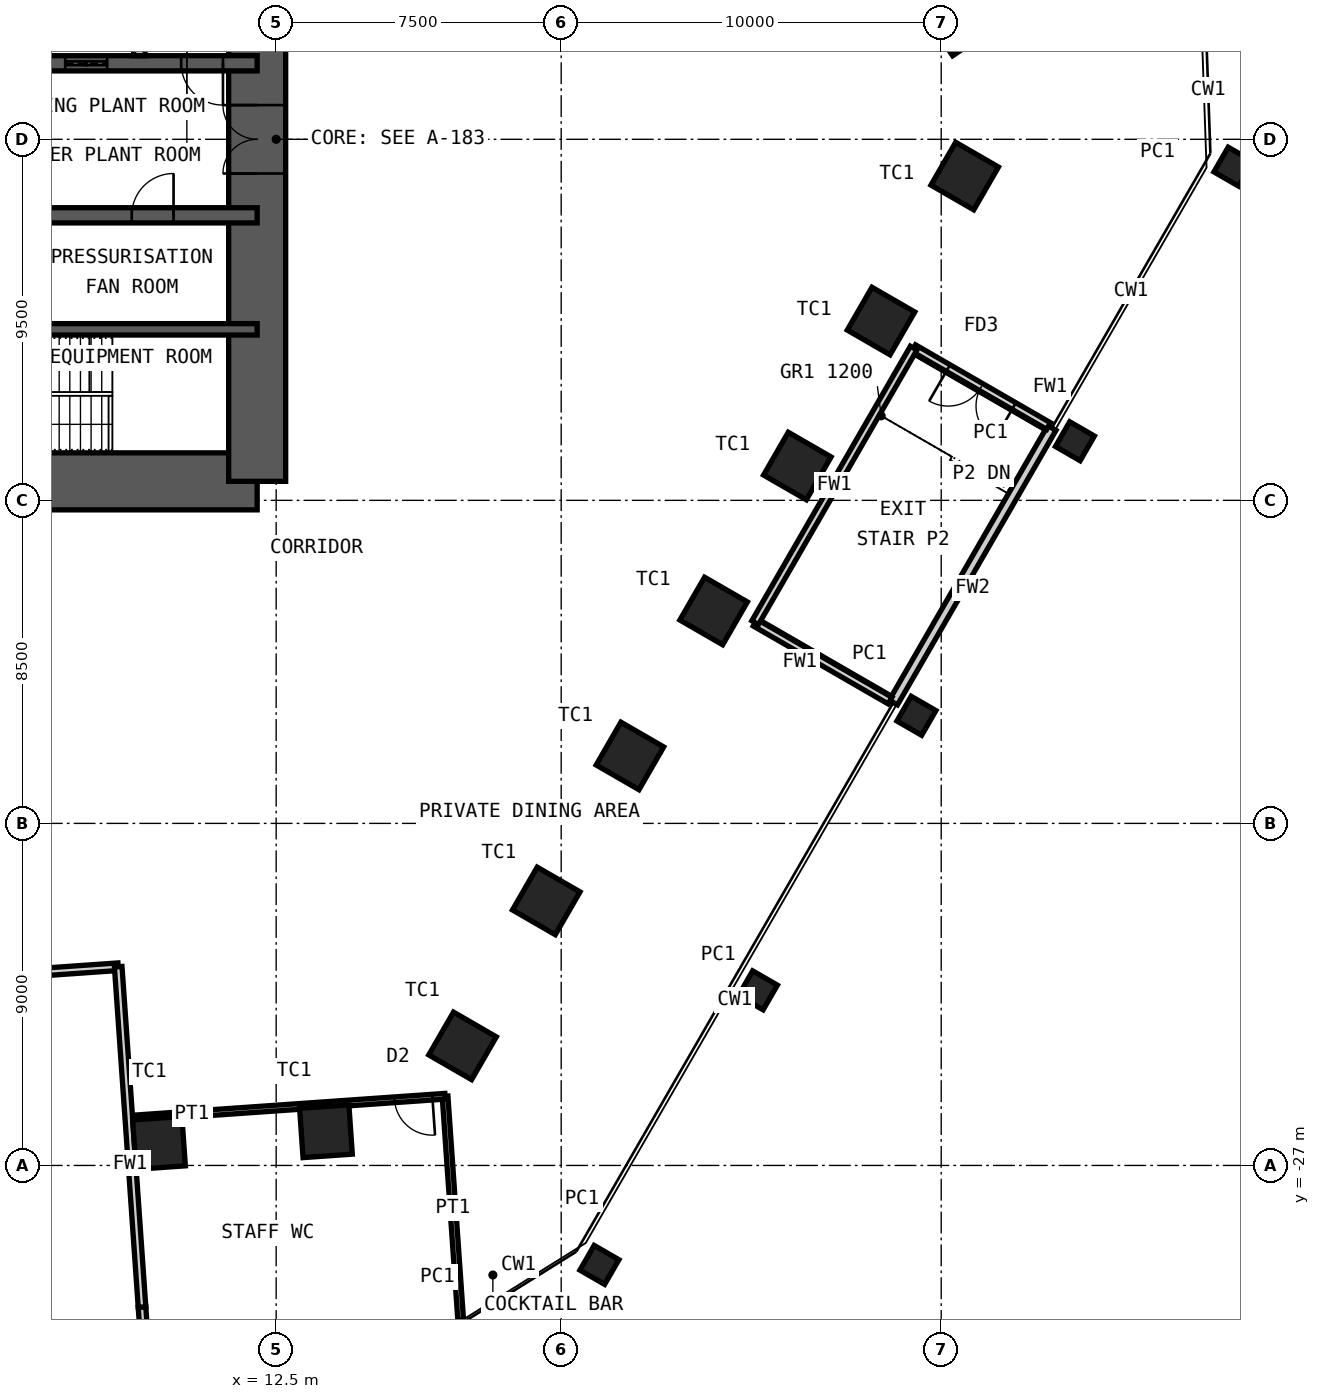
"""IFC4 building model, lengths in metres.
Left out: names, types, materials, properties, quantities, classifications, styles, units other than length and angle.
Written with IfcOpenShell. Run it as: python <this file> out.ifc"""

import sys

from ifc_helpers import new_model, si_unit, direction, frame, frame_2d, origin, origin_2d, place, context, subcontext, project, spatial, rectangle, hollow_rectangle, extrude, element, fill, save


model = new_model("IFC4")
c1 = context("Model", 3, precision=1e-05, world=origin(), true_north=direction((0.0, 1.0)))
c2 = subcontext(c1, "Body", "Model", "MODEL_VIEW")
j1 = project(units=[si_unit("LENGTHUNIT", "METRE"), si_unit("PLANEANGLEUNIT", "RADIAN")], contexts=[c1])
p1 = place(None, origin())
s1 = spatial("IfcSite", under=j1, at=p1, CompositionType="ELEMENT")
p2 = place(p1, origin())
s2 = spatial("IfcBuilding", under=s1, at=p2, CompositionType="ELEMENT")
p3 = place(p2, frame((0.0, 0.0, 12.0)))
s3 = spatial("IfcBuildingStorey", under=s2, at=p3, CompositionType="ELEMENT", Elevation=12.0)
for number, where, z_axis, x_axis in (
    (1, (30.476, 3.101, 0.0), (0.0, 0.0, 1.0), (-0.559, 0.829, 0.0)),
    (2, (30.618, -0.967, 0.0), (0.0, 0.0, 1.0), (0.5, 0.866, 0.0)),
    (3, (28.416, -4.782, 0.0), (0.0, 0.0, 1.0), (0.5, 0.866, 0.0)),
    (4, (26.214, -8.596, 0.0), (0.0, 0.0, 1.0), (0.5, 0.866, 0.0)),
    (5, (24.011, -12.411, 0.0), (0.0, 0.0, 1.0), (0.5, 0.866, 0.0)),
    (6, (21.809, -16.225, 0.0), (0.0, 0.0, 1.0), (0.5, 0.866, 0.0)),
    (7, (19.607, -20.04, 0.0), (0.0, 0.0, 1.0), (0.5, 0.866, 0.0)),
    (8, (17.405, -23.854, 0.0), (0.0, 0.0, 1.0), (0.5, 0.866, 0.0)),
    (9, (13.811, -26.1, 0.0), (0.0, 0.0, 1.0), (0.998, 0.07, 0.0)),
    (10, (9.417, -26.407, 0.0), (0.0, 0.0, 1.0), (0.998, 0.07, 0.0)),
):
    element("IfcColumn", number, at=place(p3, frame(where, z_axis=z_axis, x_axis=x_axis)), inside=s3, PredefinedType="COLUMN", context=c2, shape_type="SweptSolid", body=[
        extrude(hollow_rectangle(XDim=1.3, YDim=1.3, WallThickness=0.1, at=origin_2d()), origin(), (0.0, 0.0, 1.0), 5.0),
    ])
for number, where, z_axis, x_axis in (
    (11, (37.689, -0.72, 0.0), (0.0, 0.0, 1.0), (0.5, 0.866, 0.0)),
    (12, (33.518, -7.945, 0.0), (0.0, 0.0, 1.0), (0.5, 0.866, 0.0)),
    (13, (29.347, -15.169, 0.0), (0.0, 0.0, 1.0), (0.5, 0.866, 0.0)),
    (14, (25.177, -22.393, 0.0), (0.0, 0.0, 1.0), (0.5, 0.866, 0.0)),
    (15, (21.006, -29.617, 0.0), (0.0, 0.0, 1.0), (0.5, 0.866, 0.0)),
):
    element("IfcColumn", number, at=place(p3, frame(where, z_axis=z_axis, x_axis=x_axis)), inside=s3, PredefinedType="COLUMN", context=c2, shape_type="SweptSolid", body=[
        extrude(hollow_rectangle(XDim=0.75, YDim=0.75, WallThickness=0.036, at=origin_2d()), origin(), (0.0, 0.0, 1.0), 5.0),
    ])
p4 = place(p3, frame((-12.0, -9.0, 0.0), z_axis=(0.0, 0.0, 1.0), x_axis=(1.0, 0.0, 0.0)))
e16 = element("IfcWall", 16, at=p4, inside=s3, PredefinedType="SHEAR", context=c2, shape_type="SweptSolid", body=[
    extrude(rectangle(XDim=24.0, YDim=1.5, at=frame_2d((12.0, 0.0))), origin(), (0.0, 0.0, 1.0), 5.0),
])
p5 = place(p4, frame((1.35, 0.0, 0.0)))
e17 = element("IfcOpeningElement", 17, at=p5, cuts=e16, PredefinedType="OPENING", context=c2, shape_type="SweptSolid", body=[
    extrude(rectangle(XDim=1.0, YDim=2.1, at=frame_2d((0.5, 1.05))), frame((0.0, 0.76, 0.0), z_axis=(0.0, -1.0, 0.0), x_axis=(1.0, 0.0, 0.0)), (0.0, 0.0, 1.0), 1.52),
])
p6 = place(p4, frame((5.325, 0.0, 0.0)))
e18 = element("IfcOpeningElement", 18, at=p6, cuts=e16, PredefinedType="OPENING", context=c2, shape_type="SweptSolid", body=[
    extrude(rectangle(XDim=1.15, YDim=2.1, at=frame_2d((0.575, 1.05))), frame((0.0, 0.76, 0.0), z_axis=(0.0, -1.0, 0.0), x_axis=(1.0, 0.0, 0.0)), (0.0, 0.0, 1.0), 1.52),
])
p7 = place(p4, frame((12.6, 0.0, 0.0)))
e19 = element("IfcOpeningElement", 19, at=p7, cuts=e16, PredefinedType="OPENING", context=c2, shape_type="SweptSolid", body=[
    extrude(rectangle(XDim=1.0, YDim=2.1, at=frame_2d((0.5, 1.05))), frame((0.0, 0.76, 0.0), z_axis=(0.0, -1.0, 0.0), x_axis=(1.0, 0.0, 0.0)), (0.0, 0.0, 1.0), 1.52),
])
p8 = place(p3, frame((12.0, -9.0, 0.0), z_axis=(0.0, 0.0, 1.0), x_axis=(0.0, 1.0, 0.0)))
e20 = element("IfcWall", 20, at=p8, inside=s3, PredefinedType="SHEAR", context=c2, shape_type="SweptSolid", body=[
    extrude(rectangle(XDim=18.0, YDim=1.5, at=frame_2d((9.0, 0.0))), origin(), (0.0, 0.0, 1.0), 5.0),
])
p9 = place(p8, frame((8.1, 0.0, 0.0)))
e21 = element("IfcOpeningElement", 21, at=p9, cuts=e20, PredefinedType="OPENING", context=c2, shape_type="SweptSolid", body=[
    extrude(rectangle(XDim=1.8, YDim=2.1, at=frame_2d((0.9, 1.05))), frame((0.0, 0.76, 0.0), z_axis=(0.0, -1.0, 0.0), x_axis=(1.0, 0.0, 0.0)), (0.0, 0.0, 1.0), 1.52),
])
p10 = place(p3, frame((-12.0, 2.0, 0.0), z_axis=(0.0, 0.0, 1.0), x_axis=(1.0, 0.0, 0.0)))
e22 = element("IfcWall", 22, at=p10, inside=s3, PredefinedType="SHEAR", context=c2, shape_type="SweptSolid", body=[
    extrude(rectangle(XDim=24.0, YDim=0.4, at=frame_2d((12.0, 0.0))), origin(), (0.0, 0.0, 1.0), 5.0),
])
p11 = place(p10, frame((2.4, 0.0, 0.0)))
e23 = element("IfcOpeningElement", 23, at=p11, cuts=e22, PredefinedType="OPENING", context=c2, shape_type="SweptSolid", body=[
    extrude(rectangle(XDim=1.1, YDim=2.1, at=frame_2d((0.55, 1.05))), frame((0.0, 0.21, 0.0), z_axis=(0.0, -1.0, 0.0), x_axis=(1.0, 0.0, 0.0)), (0.0, 0.0, 1.0), 0.42),
])
p12 = place(p10, frame((22.0, 0.0, 0.0)))
e24 = element("IfcOpeningElement", 24, at=p12, cuts=e22, PredefinedType="OPENING", context=c2, shape_type="SweptSolid", body=[
    extrude(rectangle(XDim=1.1, YDim=2.1, at=frame_2d((0.55, 1.05))), frame((0.0, 0.21, 0.0), z_axis=(0.0, -1.0, 0.0), x_axis=(1.0, 0.0, 0.0)), (0.0, 0.0, 1.0), 0.42),
])
p13 = place(p10, frame((10.15, 0.0, 0.0)))
e25 = element("IfcOpeningElement", 25, at=p13, cuts=e22, PredefinedType="OPENING", context=c2, shape_type="SweptSolid", body=[
    extrude(rectangle(XDim=1.0, YDim=2.1, at=frame_2d((0.5, 1.05))), frame((0.0, 0.21, 0.0), z_axis=(0.0, -1.0, 0.0), x_axis=(1.0, 0.0, 0.0)), (0.0, 0.0, 1.0), 0.42),
])
p14 = place(p10, frame((6.7, 0.0, 0.0)))
e26 = element("IfcOpeningElement", 26, at=p14, cuts=e22, PredefinedType="OPENING", context=c2, shape_type="SweptSolid", body=[
    extrude(rectangle(XDim=1.4, YDim=2.4, at=frame_2d((0.7, 1.2))), frame((0.0, 0.21, 0.0), z_axis=(0.0, -1.0, 0.0), x_axis=(1.0, 0.0, 0.0)), (0.0, 0.0, 1.0), 0.42),
])
p15 = place(p10, frame((13.35, 0.0, 0.0)))
e27 = element("IfcOpeningElement", 27, at=p15, cuts=e22, PredefinedType="OPENING", context=c2, shape_type="SweptSolid", body=[
    extrude(rectangle(XDim=1.1, YDim=2.4, at=frame_2d((0.55, 1.2))), frame((0.0, 0.21, 0.0), z_axis=(0.0, -1.0, 0.0), x_axis=(1.0, 0.0, 0.0)), (0.0, 0.0, 1.0), 0.42),
])
p16 = place(p10, frame((16.15, 0.0, 0.0)))
e28 = element("IfcOpeningElement", 28, at=p16, cuts=e22, PredefinedType="OPENING", context=c2, shape_type="SweptSolid", body=[
    extrude(rectangle(XDim=1.1, YDim=2.4, at=frame_2d((0.55, 1.2))), frame((0.0, 0.21, 0.0), z_axis=(0.0, -1.0, 0.0), x_axis=(1.0, 0.0, 0.0)), (0.0, 0.0, 1.0), 0.42),
])
p17 = place(p10, frame((18.95, 0.0, 0.0)))
e29 = element("IfcOpeningElement", 29, at=p17, cuts=e22, PredefinedType="OPENING", context=c2, shape_type="SweptSolid", body=[
    extrude(rectangle(XDim=1.1, YDim=2.4, at=frame_2d((0.55, 1.2))), frame((0.0, 0.21, 0.0), z_axis=(0.0, -1.0, 0.0), x_axis=(1.0, 0.0, 0.0)), (0.0, 0.0, 1.0), 0.42),
])
p18 = place(p3, frame((-12.0, -2.0, 0.0), z_axis=(0.0, 0.0, 1.0), x_axis=(1.0, 0.0, 0.0)))
e30 = element("IfcWall", 30, at=p18, inside=s3, PredefinedType="SHEAR", context=c2, shape_type="SweptSolid", body=[
    extrude(rectangle(XDim=24.0, YDim=0.4, at=frame_2d((12.0, 0.0))), origin(), (0.0, 0.0, 1.0), 5.0),
])
p19 = place(p18, frame((1.1, 0.0, 0.0)))
e31 = element("IfcOpeningElement", 31, at=p19, cuts=e30, PredefinedType="OPENING", context=c2, shape_type="SweptSolid", body=[
    extrude(rectangle(XDim=1.1, YDim=2.1, at=frame_2d((0.55, 1.05))), frame((0.0, 0.21, 0.0), z_axis=(0.0, -1.0, 0.0), x_axis=(1.0, 0.0, 0.0)), (0.0, 0.0, 1.0), 0.42),
])
p20 = place(p18, frame((13.55, 0.0, 0.0)))
e32 = element("IfcOpeningElement", 32, at=p20, cuts=e30, PredefinedType="OPENING", context=c2, shape_type="SweptSolid", body=[
    extrude(rectangle(XDim=1.1, YDim=2.1, at=frame_2d((0.55, 1.05))), frame((0.0, 0.21, 0.0), z_axis=(0.0, -1.0, 0.0), x_axis=(1.0, 0.0, 0.0)), (0.0, 0.0, 1.0), 0.42),
])
p21 = place(p18, frame((20.7, 0.0, 0.0)))
e33 = element("IfcOpeningElement", 33, at=p21, cuts=e30, PredefinedType="OPENING", context=c2, shape_type="SweptSolid", body=[
    extrude(rectangle(XDim=1.1, YDim=2.1, at=frame_2d((0.55, 1.05))), frame((0.0, 0.21, 0.0), z_axis=(0.0, -1.0, 0.0), x_axis=(1.0, 0.0, 0.0)), (0.0, 0.0, 1.0), 0.42),
])
p22 = place(p3, frame((-12.0, -5.0, 0.0), z_axis=(0.0, 0.0, 1.0), x_axis=(1.0, 0.0, 0.0)))
e34 = element("IfcWall", 34, at=p22, inside=s3, PredefinedType="SHEAR", context=c2, shape_type="SweptSolid", body=[
    extrude(rectangle(XDim=24.0, YDim=0.3, at=frame_2d((12.0, 0.0))), origin(), (0.0, 0.0, 1.0), 5.0),
])
p23 = place(p3, frame((8.9, 2.2, 0.0), z_axis=(0.0, 0.0, 1.0), x_axis=(0.0, 1.0, 0.0)))
e35 = element("IfcWall", 35, at=p23, inside=s3, PredefinedType="PARTITIONING", context=c2, shape_type="SweptSolid", body=[
    extrude(rectangle(XDim=2.65, YDim=0.3, at=frame_2d((1.325, 0.0))), origin(), (0.0, 0.0, 1.0), 4.78),
])
p24 = place(p3, frame((32.912, -7.595, 0.0), z_axis=(0.0, 0.0, 1.0), x_axis=(-0.500004511595, -0.866022798998, 0.0)))
e36 = element("IfcWall", 36, at=p24, inside=s3, PredefinedType="SOLIDWALL", context=c2, shape_type="SweptSolid", body=[
    extrude(rectangle(XDim=8.342, YDim=0.25, at=frame_2d((4.171, 0.0))), origin(), (0.0, 0.0, 1.0), 4.7),
])
p25 = place(p3, frame((9.034, -31.647, 0.0), z_axis=(0.0, 0.0, 1.0), x_axis=(-0.069837025026, 0.997558414297, 0.0)))
e37 = element("IfcWall", 37, at=p25, inside=s3, PredefinedType="PARTITIONING", context=c2, shape_type="SweptSolid", body=[
    extrude(rectangle(XDim=0.923, YDim=0.2, at=frame_2d((0.461, 0.0))), origin(), (0.0, 0.0, 1.0), 3.6),
])
p26 = place(p3, frame((8.344, -21.771, 0.0), z_axis=(0.0, 0.0, 1.0), x_axis=(-0.997563959397, -0.069757773133, 0.0)))
e38 = element("IfcWall", 38, at=p26, inside=s3, PredefinedType="PARTITIONING", context=c2, shape_type="SweptSolid", body=[
    extrude(rectangle(XDim=16.684, YDim=0.2, at=frame_2d((8.342, 0.0))), origin(), (0.0, 0.0, 1.0), 4.7),
])
p27 = place(p26, frame((7.342, 0.0, 0.0)))
e39 = element("IfcOpeningElement", 39, at=p27, cuts=e38, PredefinedType="OPENING", context=c2, shape_type="SweptSolid", body=[
    extrude(rectangle(XDim=2.0, YDim=2.4, at=frame_2d((1.0, 1.2))), frame((0.0, 0.11, 0.0), z_axis=(0.0, -1.0, 0.0), x_axis=(1.0, 0.0, 0.0)), (0.0, 0.0, 1.0), 0.22),
])
p28 = place(p3, frame((17.356, -31.065, 0.0), z_axis=(0.0, 0.0, 1.0), x_axis=(-0.069767771051, 0.997563260211, 0.0)))
e40 = element("IfcWall", 40, at=p28, inside=s3, PredefinedType="PARTITIONING", context=c2, shape_type="SweptSolid", body=[
    extrude(rectangle(XDim=5.9, YDim=0.15, at=frame_2d((2.95, 0.0))), origin(), (0.0, 0.0, 1.0), 4.7),
])
p29 = place(p3, frame((16.944, -25.179, 0.0), z_axis=(0.0, 0.0, 1.0), x_axis=(-0.997564977604, -0.069743210844, 0.0)))
e41 = element("IfcWall", 41, at=p29, inside=s3, PredefinedType="PARTITIONING", context=c2, shape_type="SweptSolid", body=[
    extrude(rectangle(XDim=8.342, YDim=0.15, at=frame_2d((4.171, 0.0))), origin(), (0.0, 0.0, 1.0), 4.7),
])
p30 = place(p29, frame((0.334, 0.0, 0.0)))
e42 = element("IfcOpeningElement", 42, at=p30, cuts=e41, PredefinedType="OPENING", context=c2, shape_type="SweptSolid", body=[
    extrude(rectangle(XDim=1.0, YDim=2.4, at=frame_2d((0.5, 1.2))), frame((0.0, 0.085, 0.0), z_axis=(0.0, -1.0, 0.0), x_axis=(1.0, 0.0, 0.0)), (0.0, 0.0, 1.0), 0.17),
])
p31 = place(p3, frame((32.825, -7.545, 0.0), z_axis=(0.0, 0.0, 1.0), x_axis=(-0.8660249478, 0.500000789788, 0.0)))
e43 = element("IfcWall", 43, at=p31, inside=s3, PredefinedType="PARTITIONING", context=c2, shape_type="SweptSolid", body=[
    extrude(rectangle(XDim=4.1, YDim=0.2, at=frame_2d((2.05, 0.0))), origin(), (0.0, 0.0, 1.0), 4.7),
])
p32 = place(p31, frame((1.05, 0.0, 0.0)))
e44 = element("IfcOpeningElement", 44, at=p32, cuts=e43, PredefinedType="OPENING", context=c2, shape_type="SweptSolid", body=[
    extrude(rectangle(XDim=2.0, YDim=2.4, at=frame_2d((1.0, 1.2))), frame((0.0, 0.11, 0.0), z_axis=(0.0, -1.0, 0.0), x_axis=(1.0, 0.0, 0.0)), (0.0, 0.0, 1.0), 0.22),
])
p33 = place(p3, frame((28.655, -14.769, 0.0), z_axis=(0.0, 0.0, 1.0), x_axis=(-0.866010060309, 0.500026574738, 0.0)))
e45 = element("IfcWall", 45, at=p33, inside=s3, PredefinedType="PARTITIONING", context=c2, shape_type="SweptSolid", body=[
    extrude(rectangle(XDim=4.1, YDim=0.2, at=frame_2d((2.05, 0.0))), origin(), (0.0, 0.0, 1.0), 4.7),
])
p34 = place(p3, frame((29.275, -5.495, 0.0), z_axis=(0.0, 0.0, 1.0), x_axis=(-0.499982560684, -0.866035472144, 0.0)))
e46 = element("IfcWall", 46, at=p34, inside=s3, PredefinedType="PARTITIONING", context=c2, shape_type="SweptSolid", body=[
    extrude(rectangle(XDim=8.342, YDim=0.2, at=frame_2d((4.171, 0.0))), origin(), (0.0, 0.0, 1.0), 4.7),
])
p35 = place(p3, frame((8.97, -30.726, 0.0), z_axis=(0.0, 0.0, 1.0), x_axis=(-0.069729805766, 0.997565914708, 0.0)))
e47 = element("IfcWall", 47, at=p35, inside=s3, PredefinedType="PARTITIONING", context=c2, shape_type="SweptSolid", body=[
    extrude(rectangle(XDim=8.977, YDim=0.2, at=frame_2d((4.489, 0.0))), origin(), (0.0, 0.0, 1.0), 4.7),
])
p36 = place(p12, origin())
e48 = element("IfcDoor", 48, at=p36, inside=s3, OperationType="SINGLE_SWING_RIGHT", PredefinedType="DOOR", context=c2, shape_type="SweptSolid", body=[
    extrude(rectangle(XDim=1.1, YDim=2.1, at=frame_2d((0.55, 1.05))), frame((0.0, 0.025, 0.0), z_axis=(0.0, -1.0, 0.0), x_axis=(1.0, 0.0, 0.0)), (0.0, 0.0, 1.0), 0.05),
])
fill(e24, e48)
p37 = place(p21, origin())
e49 = element("IfcDoor", 49, at=p37, inside=s3, OperationType="SINGLE_SWING_LEFT", PredefinedType="DOOR", context=c2, shape_type="SweptSolid", body=[
    extrude(rectangle(XDim=1.1, YDim=2.1, at=frame_2d((0.55, 1.05))), frame((0.0, 0.025, 0.0), z_axis=(0.0, -1.0, 0.0), x_axis=(1.0, 0.0, 0.0)), (0.0, 0.0, 1.0), 0.05),
])
fill(e33, e49)
p38 = place(p9, origin())
e50 = element("IfcDoor", 50, at=p38, inside=s3, OperationType="DOUBLE_DOOR_DOUBLE_SWING", PredefinedType="DOOR", context=c2, shape_type="SweptSolid", body=[
    extrude(rectangle(XDim=1.8, YDim=2.1, at=frame_2d((0.9, 1.05))), frame((0.0, 0.025, 0.0), z_axis=(0.0, -1.0, 0.0), x_axis=(1.0, 0.0, 0.0)), (0.0, 0.0, 1.0), 0.05),
])
fill(e21, e50)
p39 = place(p17, origin())
e51 = element("IfcDoor", 51, at=p39, inside=s3, OperationType="DOUBLE_DOOR_SLIDING", PredefinedType="DOOR", context=c2, shape_type="SweptSolid", body=[
    extrude(rectangle(XDim=1.1, YDim=2.4, at=frame_2d((0.55, 1.2))), frame((0.0, 0.025, 0.0), z_axis=(0.0, -1.0, 0.0), x_axis=(1.0, 0.0, 0.0)), (0.0, 0.0, 1.0), 0.05),
])
fill(e29, e51)
p40 = place(p30, origin())
e52 = element("IfcDoor", 52, at=p40, inside=s3, OperationType="SINGLE_SWING_RIGHT", PredefinedType="DOOR", context=c2, shape_type="SweptSolid", body=[
    extrude(rectangle(XDim=1.0, YDim=2.4, at=frame_2d((0.5, 1.2))), frame((0.0, 0.025, 0.0), z_axis=(0.0, -1.0, 0.0), x_axis=(1.0, 0.0, 0.0)), (0.0, 0.0, 1.0), 0.05),
])
fill(e42, e52)
p41 = place(p32, origin())
e53 = element("IfcDoor", 53, at=p41, inside=s3, OperationType="DOUBLE_DOOR_DOUBLE_SWING", PredefinedType="DOOR", context=c2, shape_type="SweptSolid", body=[
    extrude(rectangle(XDim=2.0, YDim=2.4, at=frame_2d((1.0, 1.2))), frame((0.0, 0.025, 0.0), z_axis=(0.0, -1.0, 0.0), x_axis=(1.0, 0.0, 0.0)), (0.0, 0.0, 1.0), 0.05),
])
fill(e44, e53)
save(model, sys.argv[1])
